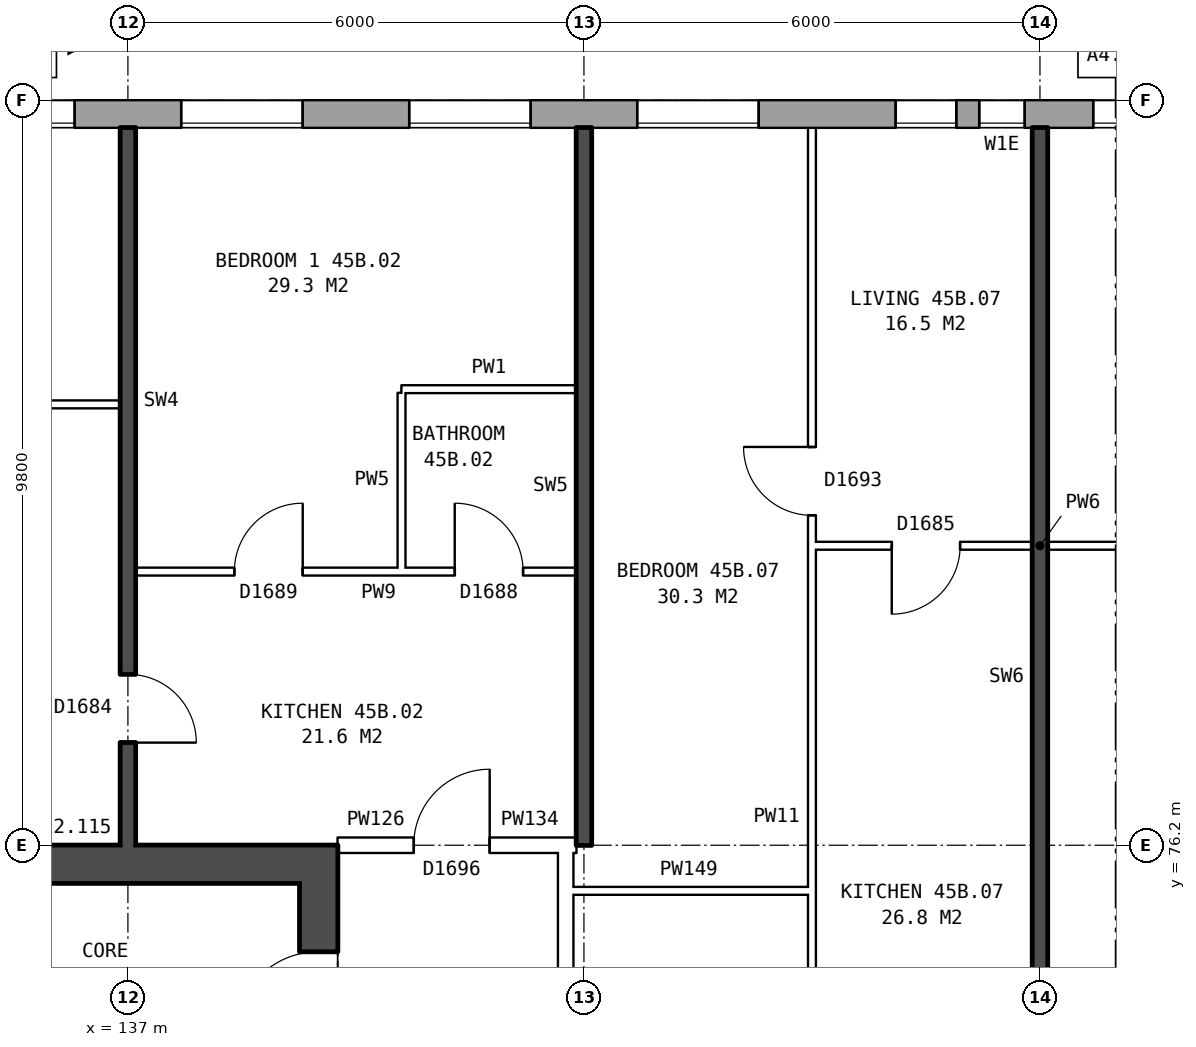
"""IFC4 building model, lengths in metres.
Left out: names, types, materials, properties, quantities, classifications, styles, units other than length and angle.
Written with IfcOpenShell. Run it as: python <this file> out.ifc"""

import sys

from ifc_helpers import new_model, si_unit, direction, frame, frame_2d, origin, place, context, subcontext, project, spatial, rectangle, extrude, element, fill, save


model = new_model("IFC4")
c1 = context("Model", 3, precision=1e-05, world=origin(), true_north=direction((0.0, 1.0)))
c2 = subcontext(c1, "Body", "Model", "MODEL_VIEW")
j1 = project(units=[si_unit("LENGTHUNIT", "METRE"), si_unit("PLANEANGLEUNIT", "RADIAN")], contexts=[c1])
p1 = place(None, origin())
s1 = spatial("IfcSite", under=j1, at=p1, CompositionType="ELEMENT")
p2 = place(p1, origin())
s2 = spatial("IfcBuilding", under=s1, at=p2, CompositionType="ELEMENT")
p3 = place(p2, frame((0.0, 0.0, 160.9)))
s3 = spatial("IfcBuildingStorey", under=s2, at=p3, CompositionType="ELEMENT", Elevation=160.9)
p4 = place(p3, frame((168.425, 85.82, 0.0), z_axis=(0.0, 0.0, 1.0), x_axis=(-1.0, 0.0, 0.0)))
e1 = element("IfcWall", 1, at=p4, inside=s3, PredefinedType="STANDARD", context=c2, shape_type="SweptSolid", body=[
    extrude(rectangle(XDim=34.351, YDim=0.36, at=frame_2d((17.175, 0.0))), origin(), (0.0, 0.0, 1.0), 2.85),
])
p5 = place(p4, frame((2.125, 0.0, 0.8)))
e2 = element("IfcOpeningElement", 2, at=p5, cuts=e1, PredefinedType="OPENING", context=c2, shape_type="SweptSolid", body=[
    extrude(rectangle(XDim=1.6, YDim=1.8, at=frame_2d((0.8, 0.9))), frame((0.0, 0.19, 0.0), z_axis=(0.0, -1.0, 0.0), x_axis=(1.0, 0.0, 0.0)), (0.0, 0.0, 1.0), 0.38),
])
p6 = place(p4, frame((5.125, 0.0, 0.8)))
e3 = element("IfcOpeningElement", 3, at=p6, cuts=e1, PredefinedType="OPENING", context=c2, shape_type="SweptSolid", body=[
    extrude(rectangle(XDim=1.6, YDim=1.8, at=frame_2d((0.8, 0.9))), frame((0.0, 0.19, 0.0), z_axis=(0.0, -1.0, 0.0), x_axis=(1.0, 0.0, 0.0)), (0.0, 0.0, 1.0), 0.38),
])
p7 = place(p4, frame((8.125, 0.0, 0.8)))
e4 = element("IfcOpeningElement", 4, at=p7, cuts=e1, PredefinedType="OPENING", context=c2, shape_type="SweptSolid", body=[
    extrude(rectangle(XDim=1.6, YDim=1.8, at=frame_2d((0.8, 0.9))), frame((0.0, 0.19, 0.0), z_axis=(0.0, -1.0, 0.0), x_axis=(1.0, 0.0, 0.0)), (0.0, 0.0, 1.0), 0.38),
])
p8 = place(p4, frame((10.025, 0.0, 0.8)))
e5 = element("IfcOpeningElement", 5, at=p8, cuts=e1, PredefinedType="OPENING", context=c2, shape_type="SweptSolid", body=[
    extrude(rectangle(XDim=1.0, YDim=1.8, at=frame_2d((0.5, 0.9))), frame((0.0, 0.19, 0.0), z_axis=(0.0, -1.0, 0.0), x_axis=(1.0, 0.0, 0.0)), (0.0, 0.0, 1.0), 0.38),
])
p9 = place(p4, frame((14.125, 0.0, 0.8)))
e6 = element("IfcOpeningElement", 6, at=p9, cuts=e1, PredefinedType="OPENING", context=c2, shape_type="SweptSolid", body=[
    extrude(rectangle(XDim=1.6, YDim=1.8, at=frame_2d((0.8, 0.9))), frame((0.0, 0.19, 0.0), z_axis=(0.0, -1.0, 0.0), x_axis=(1.0, 0.0, 0.0)), (0.0, 0.0, 1.0), 0.38),
])
p10 = place(p4, frame((17.125, 0.0, 0.8)))
e7 = element("IfcOpeningElement", 7, at=p10, cuts=e1, PredefinedType="OPENING", context=c2, shape_type="SweptSolid", body=[
    extrude(rectangle(XDim=1.6, YDim=1.8, at=frame_2d((0.8, 0.9))), frame((0.0, 0.19, 0.0), z_axis=(0.0, -1.0, 0.0), x_axis=(1.0, 0.0, 0.0)), (0.0, 0.0, 1.0), 0.38),
])
p11 = place(p4, frame((19.625, 0.0, 0.65)))
e8 = element("IfcOpeningElement", 8, at=p11, cuts=e1, PredefinedType="OPENING", context=c2, shape_type="SweptSolid", body=[
    extrude(rectangle(XDim=0.6, YDim=1.8, at=frame_2d((0.3, 0.9))), frame((0.0, 0.19, 0.0), z_axis=(0.0, -1.0, 0.0), x_axis=(1.0, 0.0, 0.0)), (0.0, 0.0, 1.0), 0.38),
])
p12 = place(p4, frame((23.125, 0.0, 0.8)))
e9 = element("IfcOpeningElement", 9, at=p12, cuts=e1, PredefinedType="OPENING", context=c2, shape_type="SweptSolid", body=[
    extrude(rectangle(XDim=1.6, YDim=1.8, at=frame_2d((0.8, 0.9))), frame((0.0, 0.19, 0.0), z_axis=(0.0, -1.0, 0.0), x_axis=(1.0, 0.0, 0.0)), (0.0, 0.0, 1.0), 0.38),
])
p13 = place(p4, frame((26.125, 0.0, 0.8)))
e10 = element("IfcOpeningElement", 10, at=p13, cuts=e1, PredefinedType="OPENING", context=c2, shape_type="SweptSolid", body=[
    extrude(rectangle(XDim=1.6, YDim=1.8, at=frame_2d((0.8, 0.9))), frame((0.0, 0.19, 0.0), z_axis=(0.0, -1.0, 0.0), x_axis=(1.0, 0.0, 0.0)), (0.0, 0.0, 1.0), 0.38),
])
p14 = place(p4, frame((29.125, 0.0, 0.8)))
e11 = element("IfcOpeningElement", 11, at=p14, cuts=e1, PredefinedType="OPENING", context=c2, shape_type="SweptSolid", body=[
    extrude(rectangle(XDim=1.6, YDim=1.8, at=frame_2d((0.8, 0.9))), frame((0.0, 0.19, 0.0), z_axis=(0.0, -1.0, 0.0), x_axis=(1.0, 0.0, 0.0)), (0.0, 0.0, 1.0), 0.38),
])
p15 = place(p4, frame((32.125, 0.0, 0.8)))
e12 = element("IfcOpeningElement", 12, at=p15, cuts=e1, PredefinedType="OPENING", context=c2, shape_type="SweptSolid", body=[
    extrude(rectangle(XDim=1.6, YDim=1.8, at=frame_2d((0.8, 0.9))), frame((0.0, 0.19, 0.0), z_axis=(0.0, -1.0, 0.0), x_axis=(1.0, 0.0, 0.0)), (0.0, 0.0, 1.0), 0.38),
])
p16 = place(p4, frame((11.325, 0.0, 1.7)))
e13 = element("IfcOpeningElement", 13, at=p16, cuts=e1, PredefinedType="OPENING", context=c2, shape_type="SweptSolid", body=[
    extrude(rectangle(XDim=0.8, YDim=0.9, at=frame_2d((0.4, 0.45))), frame((0.0, 0.19, 0.0), z_axis=(0.0, -1.0, 0.0), x_axis=(1.0, 0.0, 0.0)), (0.0, 0.0, 1.0), 0.38),
])
p17 = place(p4, frame((20.525, 0.0, 0.55)))
e14 = element("IfcOpeningElement", 14, at=p17, cuts=e1, PredefinedType="OPENING", context=c2, shape_type="SweptSolid", body=[
    extrude(rectangle(XDim=0.8, YDim=0.9, at=frame_2d((0.4, 0.45))), frame((0.0, 0.19, 0.0), z_axis=(0.0, -1.0, 0.0), x_axis=(1.0, 0.0, 0.0)), (0.0, 0.0, 1.0), 0.38),
])
p18 = place(p3, frame((139.51, 63.8, 0.0), z_axis=(0.0, 0.0, 1.0), x_axis=(0.0, 1.0, 0.0)))
e15 = element("IfcWall", 15, at=p18, inside=s3, PredefinedType="SHEAR", context=c2, shape_type="SweptSolid", body=[
    extrude(rectangle(XDim=12.4, YDim=0.5, at=frame_2d((6.2, 0.0))), origin(), (0.0, 0.0, 1.0), 2.85),
])
p19 = place(p18, frame((1.325, 0.0, 0.0)))
e16 = element("IfcOpeningElement", 16, at=p19, cuts=e15, PredefinedType="OPENING", context=c2, shape_type="SweptSolid", body=[
    extrude(rectangle(XDim=1.1, YDim=2.1, at=frame_2d((0.55, 1.05))), frame((0.0, 0.26, 0.0), z_axis=(0.0, -1.0, 0.0), x_axis=(1.0, 0.0, 0.0)), (0.0, 0.0, 1.0), 0.52),
])
p20 = place(p18, frame((3.6, 0.0, 0.0)))
e17 = element("IfcOpeningElement", 17, at=p20, cuts=e15, PredefinedType="OPENING", context=c2, shape_type="SweptSolid", body=[
    extrude(rectangle(XDim=1.1, YDim=2.1, at=frame_2d((0.55, 1.05))), frame((0.0, 0.26, 0.0), z_axis=(0.0, -1.0, 0.0), x_axis=(1.0, 0.0, 0.0)), (0.0, 0.0, 1.0), 0.52),
])
p21 = place(p18, frame((5.8, 0.0, 0.0)))
e18 = element("IfcOpeningElement", 18, at=p21, cuts=e15, PredefinedType="OPENING", context=c2, shape_type="SweptSolid", body=[
    extrude(rectangle(XDim=1.1, YDim=2.1, at=frame_2d((0.55, 1.05))), frame((0.0, 0.26, 0.0), z_axis=(0.0, -1.0, 0.0), x_axis=(1.0, 0.0, 0.0)), (0.0, 0.0, 1.0), 0.52),
])
p22 = place(p18, frame((9.9, 0.0, 0.0)))
e19 = element("IfcOpeningElement", 19, at=p22, cuts=e15, PredefinedType="OPENING", context=c2, shape_type="SweptSolid", body=[
    extrude(rectangle(XDim=1.1, YDim=2.1, at=frame_2d((0.55, 1.05))), frame((0.0, 0.26, 0.0), z_axis=(0.0, -1.0, 0.0), x_axis=(1.0, 0.0, 0.0)), (0.0, 0.0, 1.0), 0.52),
])
p23 = place(p18, frame((8.125, 0.0, 0.0)))
e20 = element("IfcOpeningElement", 20, at=p23, cuts=e15, PredefinedType="OPENING", context=c2, shape_type="SweptSolid", body=[
    extrude(rectangle(XDim=0.85, YDim=2.1, at=frame_2d((0.425, 1.05))), frame((0.0, 0.26, 0.0), z_axis=(0.0, -1.0, 0.0), x_axis=(1.0, 0.0, 0.0)), (0.0, 0.0, 1.0), 0.52),
])
p24 = place(p3, frame((139.26, 75.95, 0.0), z_axis=(0.0, 0.0, 1.0), x_axis=(-1.0, 0.0, 0.0)))
e21 = element("IfcWall", 21, at=p24, inside=s3, PredefinedType="SHEAR", context=c2, shape_type="SweptSolid", body=[
    extrude(rectangle(XDim=7.4, YDim=0.5, at=frame_2d((3.7, 0.0))), origin(), (0.0, 0.0, 1.0), 2.85),
])
p25 = place(p3, frame((142.76, 63.9, 0.0), z_axis=(0.0, 0.0, 1.0), x_axis=(0.0, 1.0, 0.0)))
e22 = element("IfcWall", 22, at=p25, inside=s3, PredefinedType="PARTITIONING", context=c2, shape_type="SweptSolid", body=[
    extrude(rectangle(XDim=12.2, YDim=0.2, at=frame_2d((6.1, 0.0))), origin(), (0.0, 0.0, 1.0), 2.85),
])
p26 = place(p25, frame((5.1, 0.0, 0.0)))
e23 = element("IfcOpeningElement", 23, at=p26, cuts=e22, PredefinedType="OPENING", context=c2, shape_type="SweptSolid", body=[
    extrude(rectangle(XDim=2.0, YDim=2.1, at=frame_2d((1.0, 1.05))), frame((0.0, 0.11, 0.0), z_axis=(0.0, -1.0, 0.0), x_axis=(1.0, 0.0, 0.0)), (0.0, 0.0, 1.0), 0.22),
])
p27 = place(p3, frame((142.76, 75.6, 0.0), z_axis=(0.0, 0.0, 1.0), x_axis=(1.0, 0.0, 0.0)))
e24 = element("IfcWall", 24, at=p27, inside=s3, PredefinedType="PARTITIONING", context=c2, shape_type="SweptSolid", body=[
    extrude(rectangle(XDim=3.24, YDim=0.1, at=frame_2d((1.62, 0.0))), origin(), (0.0, 0.0, 1.0), 2.85),
])
p28 = place(p3, frame((139.76, 76.2, 0.0), z_axis=(0.0, 0.0, 1.0), x_axis=(1.0, 0.0, 0.0)))
e25 = element("IfcWall", 25, at=p28, inside=s3, PredefinedType="PARTITIONING", context=c2, shape_type="SweptSolid", body=[
    extrude(rectangle(XDim=3.0, YDim=0.2, at=frame_2d((1.5, 0.0))), origin(), (0.0, 0.0, 1.0), 2.85),
])
p29 = place(p28, frame((1.0, 0.0, 0.0)))
e26 = element("IfcOpeningElement", 26, at=p29, cuts=e25, PredefinedType="OPENING", context=c2, shape_type="SweptSolid", body=[
    extrude(rectangle(XDim=1.0, YDim=2.1, at=frame_2d((0.5, 1.05))), frame((0.0, 0.11, 0.0), z_axis=(0.0, -1.0, 0.0), x_axis=(1.0, 0.0, 0.0)), (0.0, 0.0, 1.0), 0.22),
])
p30 = place(p3, frame((142.76, 76.2, 0.0), z_axis=(0.0, 0.0, 1.0), x_axis=(1.0, 0.0, 0.0)))
e27 = element("IfcWall", 27, at=p30, inside=s3, PredefinedType="PARTITIONING", context=c2, shape_type="SweptSolid", body=[
    extrude(rectangle(XDim=0.14, YDim=0.2, at=frame_2d((0.07, 0.0))), origin(), (0.0, 0.0, 1.0), 2.85),
])
p31 = place(p3, frame((137.1, 79.8, 0.0), z_axis=(0.0, 0.0, 1.0), x_axis=(1.0, 0.0, 0.0)))
e28 = element("IfcWall", 28, at=p31, inside=s3, PredefinedType="PARTITIONING", context=c2, shape_type="SweptSolid", body=[
    extrude(rectangle(XDim=5.8, YDim=0.1, at=frame_2d((2.9, 0.0))), origin(), (0.0, 0.0, 1.0), 2.85),
])
p32 = place(p31, frame((1.3, 0.0, 0.0)))
e29 = element("IfcOpeningElement", 29, at=p32, cuts=e28, PredefinedType="OPENING", context=c2, shape_type="SweptSolid", body=[
    extrude(rectangle(XDim=0.9, YDim=2.1, at=frame_2d((0.45, 1.05))), frame((0.0, 0.06, 0.0), z_axis=(0.0, -1.0, 0.0), x_axis=(1.0, 0.0, 0.0)), (0.0, 0.0, 1.0), 0.12),
])
p33 = place(p31, frame((4.2, 0.0, 0.0)))
e30 = element("IfcOpeningElement", 30, at=p33, cuts=e28, PredefinedType="OPENING", context=c2, shape_type="SweptSolid", body=[
    extrude(rectangle(XDim=0.9, YDim=2.1, at=frame_2d((0.45, 1.05))), frame((0.0, 0.06, 0.0), z_axis=(0.0, -1.0, 0.0), x_axis=(1.0, 0.0, 0.0)), (0.0, 0.0, 1.0), 0.12),
])
p34 = place(p3, frame((146.0, 80.14, 0.0), z_axis=(0.0, 0.0, 1.0), x_axis=(1.0, 0.0, 0.0)))
e31 = element("IfcWall", 31, at=p34, inside=s3, PredefinedType="PARTITIONING", context=c2, shape_type="SweptSolid", body=[
    extrude(rectangle(XDim=6.0, YDim=0.1, at=frame_2d((3.0, 0.0))), origin(), (0.0, 0.0, 1.0), 2.85),
])
p35 = place(p34, frame((1.05, 0.0, 0.0)))
e32 = element("IfcOpeningElement", 32, at=p35, cuts=e31, PredefinedType="OPENING", context=c2, shape_type="SweptSolid", body=[
    extrude(rectangle(XDim=0.9, YDim=2.1, at=frame_2d((0.45, 1.05))), frame((0.0, 0.06, 0.0), z_axis=(0.0, -1.0, 0.0), x_axis=(1.0, 0.0, 0.0)), (0.0, 0.0, 1.0), 0.12),
])
p36 = place(p34, frame((4.05, 0.0, 0.0)))
e33 = element("IfcOpeningElement", 33, at=p36, cuts=e31, PredefinedType="OPENING", context=c2, shape_type="SweptSolid", body=[
    extrude(rectangle(XDim=0.9, YDim=2.1, at=frame_2d((0.45, 1.05))), frame((0.0, 0.06, 0.0), z_axis=(0.0, -1.0, 0.0), x_axis=(1.0, 0.0, 0.0)), (0.0, 0.0, 1.0), 0.12),
])
p37 = place(p3, frame((131.36, 82.0, 0.0), z_axis=(0.0, 0.0, 1.0), x_axis=(1.0, 0.0, 0.0)))
e34 = element("IfcWall", 34, at=p37, inside=s3, PredefinedType="PARTITIONING", context=c2, shape_type="SweptSolid", body=[
    extrude(rectangle(XDim=5.54, YDim=0.1, at=frame_2d((2.77, 0.0))), origin(), (0.0, 0.0, 1.0), 2.85),
])
p38 = place(p37, frame((2.32, 0.0, 0.0)))
e35 = element("IfcOpeningElement", 35, at=p38, cuts=e34, PredefinedType="OPENING", context=c2, shape_type="SweptSolid", body=[
    extrude(rectangle(XDim=0.9, YDim=2.1, at=frame_2d((0.45, 1.05))), frame((0.0, 0.06, 0.0), z_axis=(0.0, -1.0, 0.0), x_axis=(1.0, 0.0, 0.0)), (0.0, 0.0, 1.0), 0.12),
])
p39 = place(p3, frame((140.6, 82.2, 0.0), z_axis=(0.0, 0.0, 1.0), x_axis=(1.0, 0.0, 0.0)))
e36 = element("IfcWall", 36, at=p39, inside=s3, PredefinedType="PARTITIONING", context=c2, shape_type="SweptSolid", body=[
    extrude(rectangle(XDim=2.3, YDim=0.1, at=frame_2d((1.15, 0.0))), origin(), (0.0, 0.0, 1.0), 2.85),
])
p40 = place(p3, frame((137.0, 76.2, 0.0), z_axis=(0.0, 0.0, 1.0), x_axis=(0.0, 1.0, 0.0)))
e37 = element("IfcWall", 37, at=p40, inside=s3, PredefinedType="SOLIDWALL", context=c2, shape_type="SweptSolid", body=[
    extrude(rectangle(XDim=9.44, YDim=0.2, at=frame_2d((4.72, 0.0))), origin(), (0.0, 0.0, 1.0), 2.85),
])
p41 = place(p40, frame((1.35, 0.0, 0.0)))
e38 = element("IfcOpeningElement", 38, at=p41, cuts=e37, PredefinedType="OPENING", context=c2, shape_type="SweptSolid", body=[
    extrude(rectangle(XDim=0.9, YDim=2.1, at=frame_2d((0.45, 1.05))), frame((0.0, 0.11, 0.0), z_axis=(0.0, -1.0, 0.0), x_axis=(1.0, 0.0, 0.0)), (0.0, 0.0, 1.0), 0.22),
])
p42 = place(p3, frame((140.6, 79.85, 0.0), z_axis=(0.0, 0.0, 1.0), x_axis=(0.0, 1.0, 0.0)))
e39 = element("IfcWall", 39, at=p42, inside=s3, PredefinedType="PARTITIONING", context=c2, shape_type="SweptSolid", body=[
    extrude(rectangle(XDim=2.3, YDim=0.1, at=frame_2d((1.15, 0.0))), origin(), (0.0, 0.0, 1.0), 2.85),
])
p43 = place(p3, frame((143.0, 76.2, 0.0), z_axis=(0.0, 0.0, 1.0), x_axis=(0.0, 1.0, 0.0)))
e40 = element("IfcWall", 40, at=p43, inside=s3, PredefinedType="SOLIDWALL", context=c2, shape_type="SweptSolid", body=[
    extrude(rectangle(XDim=9.44, YDim=0.2, at=frame_2d((4.72, 0.0))), origin(), (0.0, 0.0, 1.0), 2.85),
])
p44 = place(p3, frame((146.0, 71.3, 0.0), z_axis=(0.0, 0.0, 1.0), x_axis=(0.0, 1.0, 0.0)))
e41 = element("IfcWall", 41, at=p44, inside=s3, PredefinedType="PARTITIONING", context=c2, shape_type="SweptSolid", body=[
    extrude(rectangle(XDim=14.34, YDim=0.1, at=frame_2d((7.17, 0.0))), origin(), (0.0, 0.0, 1.0), 2.85),
])
p45 = place(p44, frame((9.24, 0.0, 0.0)))
e42 = element("IfcOpeningElement", 42, at=p45, cuts=e41, PredefinedType="OPENING", context=c2, shape_type="SweptSolid", body=[
    extrude(rectangle(XDim=0.9, YDim=2.1, at=frame_2d((0.45, 1.05))), frame((0.0, 0.06, 0.0), z_axis=(0.0, -1.0, 0.0), x_axis=(1.0, 0.0, 0.0)), (0.0, 0.0, 1.0), 0.12),
])
p46 = place(p44, frame((0.4, 0.0, 0.0)))
e43 = element("IfcOpeningElement", 43, at=p46, cuts=e41, PredefinedType="OPENING", context=c2, shape_type="SweptSolid", body=[
    extrude(rectangle(XDim=0.9, YDim=2.1, at=frame_2d((0.45, 1.05))), frame((0.0, 0.06, 0.0), z_axis=(0.0, -1.0, 0.0), x_axis=(1.0, 0.0, 0.0)), (0.0, 0.0, 1.0), 0.12),
])
p47 = place(p3, frame((149.0, 71.2, 0.0), z_axis=(0.0, 0.0, 1.0), x_axis=(0.0, 1.0, 0.0)))
e44 = element("IfcWall", 44, at=p47, inside=s3, PredefinedType="SOLIDWALL", context=c2, shape_type="SweptSolid", body=[
    extrude(rectangle(XDim=14.44, YDim=0.2, at=frame_2d((7.22, 0.0))), origin(), (0.0, 0.0, 1.0), 2.85),
])
p48 = place(p10, origin())
e45 = element("IfcWindow", 45, at=p48, inside=s3, PartitioningType="SINGLE_PANEL", PredefinedType="WINDOW", context=c2, shape_type="SweptSolid", body=[
    extrude(rectangle(XDim=1.6, YDim=1.8, at=frame_2d((0.8, 0.9))), frame((0.0, 0.15, 0.0), z_axis=(0.0, -1.0, 0.0), x_axis=(1.0, 0.0, 0.0)), (0.0, 0.0, 1.0), 0.06),
])
fill(e7, e45)
p49 = place(p11, origin())
e46 = element("IfcWindow", 46, at=p49, inside=s3, PartitioningType="SINGLE_PANEL", PredefinedType="WINDOW", context=c2, shape_type="SweptSolid", body=[
    extrude(rectangle(XDim=0.6, YDim=1.8, at=frame_2d((0.3, 0.9))), frame((0.0, 0.15, 0.0), z_axis=(0.0, -1.0, 0.0), x_axis=(1.0, 0.0, 0.0)), (0.0, 0.0, 1.0), 0.06),
])
fill(e8, e46)
p50 = place(p12, origin())
e47 = element("IfcWindow", 47, at=p50, inside=s3, PartitioningType="SINGLE_PANEL", PredefinedType="WINDOW", context=c2, shape_type="SweptSolid", body=[
    extrude(rectangle(XDim=1.6, YDim=1.8, at=frame_2d((0.8, 0.9))), frame((0.0, 0.15, 0.0), z_axis=(0.0, -1.0, 0.0), x_axis=(1.0, 0.0, 0.0)), (0.0, 0.0, 1.0), 0.06),
])
fill(e9, e47)
p51 = place(p13, origin())
e48 = element("IfcWindow", 48, at=p51, inside=s3, PartitioningType="SINGLE_PANEL", PredefinedType="WINDOW", context=c2, shape_type="SweptSolid", body=[
    extrude(rectangle(XDim=1.6, YDim=1.8, at=frame_2d((0.8, 0.9))), frame((0.0, 0.15, 0.0), z_axis=(0.0, -1.0, 0.0), x_axis=(1.0, 0.0, 0.0)), (0.0, 0.0, 1.0), 0.06),
])
fill(e10, e48)
p52 = place(p14, origin())
e49 = element("IfcWindow", 49, at=p52, inside=s3, PartitioningType="SINGLE_PANEL", PredefinedType="WINDOW", context=c2, shape_type="SweptSolid", body=[
    extrude(rectangle(XDim=1.6, YDim=1.8, at=frame_2d((0.8, 0.9))), frame((0.0, 0.15, 0.0), z_axis=(0.0, -1.0, 0.0), x_axis=(1.0, 0.0, 0.0)), (0.0, 0.0, 1.0), 0.06),
])
fill(e11, e49)
p53 = place(p15, origin())
e50 = element("IfcWindow", 50, at=p53, inside=s3, PartitioningType="SINGLE_PANEL", PredefinedType="WINDOW", context=c2, shape_type="SweptSolid", body=[
    extrude(rectangle(XDim=1.6, YDim=1.8, at=frame_2d((0.8, 0.9))), frame((0.0, 0.15, 0.0), z_axis=(0.0, -1.0, 0.0), x_axis=(1.0, 0.0, 0.0)), (0.0, 0.0, 1.0), 0.06),
])
fill(e12, e50)
p54 = place(p22, origin())
e51 = element("IfcDoor", 51, at=p54, inside=s3, OperationType="SINGLE_SWING_LEFT", PredefinedType="DOOR", context=c2, shape_type="SweptSolid", body=[
    extrude(rectangle(XDim=1.1, YDim=2.1, at=frame_2d((0.55, 1.05))), frame((0.0, 0.235, 0.0), z_axis=(0.0, -1.0, 0.0), x_axis=(1.0, 0.0, 0.0)), (0.0, 0.0, 1.0), 0.05),
])
fill(e19, e51)
p55 = place(p32, origin())
e52 = element("IfcDoor", 52, at=p55, inside=s3, OperationType="SINGLE_SWING_RIGHT", PredefinedType="DOOR", context=c2, shape_type="SweptSolid", body=[
    extrude(rectangle(XDim=0.9, YDim=2.1, at=frame_2d((0.45, 1.05))), frame((0.0, 0.025, 0.0), z_axis=(0.0, -1.0, 0.0), x_axis=(1.0, 0.0, 0.0)), (0.0, 0.0, 1.0), 0.05),
])
fill(e29, e52)
p56 = place(p29, origin())
e53 = element("IfcDoor", 53, at=p56, inside=s3, OperationType="SINGLE_SWING_RIGHT", PredefinedType="DOOR", context=c2, shape_type="SweptSolid", body=[
    extrude(rectangle(XDim=1.0, YDim=2.1, at=frame_2d((0.5, 1.05))), frame((0.0, 0.025, 0.0), z_axis=(0.0, -1.0, 0.0), x_axis=(1.0, 0.0, 0.0)), (0.0, 0.0, 1.0), 0.05),
])
fill(e26, e53)
p57 = place(p41, frame((0.9, 0.0, 0.0), z_axis=(0.0, 0.0, 1.0), x_axis=(-1.0, 0.0, 0.0)))
e54 = element("IfcDoor", 54, at=p57, inside=s3, OperationType="SINGLE_SWING_RIGHT", PredefinedType="DOOR", context=c2, shape_type="SweptSolid", body=[
    extrude(rectangle(XDim=0.9, YDim=2.1, at=frame_2d((0.45, 1.05))), frame((0.0, 0.025, 0.0), z_axis=(0.0, -1.0, 0.0), x_axis=(1.0, 0.0, 0.0)), (0.0, 0.0, 1.0), 0.05),
])
fill(e38, e54)
p58 = place(p33, origin())
e55 = element("IfcDoor", 55, at=p58, inside=s3, OperationType="SINGLE_SWING_LEFT", PredefinedType="DOOR", context=c2, shape_type="SweptSolid", body=[
    extrude(rectangle(XDim=0.9, YDim=2.1, at=frame_2d((0.45, 1.05))), frame((0.0, 0.025, 0.0), z_axis=(0.0, -1.0, 0.0), x_axis=(1.0, 0.0, 0.0)), (0.0, 0.0, 1.0), 0.05),
])
fill(e30, e55)
p59 = place(p45, origin())
e56 = element("IfcDoor", 56, at=p59, inside=s3, OperationType="SINGLE_SWING_RIGHT", PredefinedType="DOOR", context=c2, shape_type="SweptSolid", body=[
    extrude(rectangle(XDim=0.9, YDim=2.1, at=frame_2d((0.45, 1.05))), frame((0.0, 0.025, 0.0), z_axis=(0.0, -1.0, 0.0), x_axis=(1.0, 0.0, 0.0)), (0.0, 0.0, 1.0), 0.05),
])
fill(e42, e56)
p60 = place(p35, frame((0.9, 0.0, 0.0), z_axis=(0.0, 0.0, 1.0), x_axis=(-1.0, 0.0, 0.0)))
e57 = element("IfcDoor", 57, at=p60, inside=s3, OperationType="SINGLE_SWING_RIGHT", PredefinedType="DOOR", context=c2, shape_type="SweptSolid", body=[
    extrude(rectangle(XDim=0.9, YDim=2.1, at=frame_2d((0.45, 1.05))), frame((0.0, 0.025, 0.0), z_axis=(0.0, -1.0, 0.0), x_axis=(1.0, 0.0, 0.0)), (0.0, 0.0, 1.0), 0.05),
])
fill(e32, e57)
p61 = place(p17, origin())
e58 = element("IfcWindow", 58, at=p61, inside=s3, PartitioningType="SINGLE_PANEL", PredefinedType="WINDOW", context=c2, shape_type="SweptSolid", body=[
    extrude(rectangle(XDim=0.8, YDim=0.9, at=frame_2d((0.4, 0.45))), frame((0.0, 0.15, 0.0), z_axis=(0.0, -1.0, 0.0), x_axis=(1.0, 0.0, 0.0)), (0.0, 0.0, 1.0), 0.06),
])
fill(e14, e58)
save(model, sys.argv[1])
